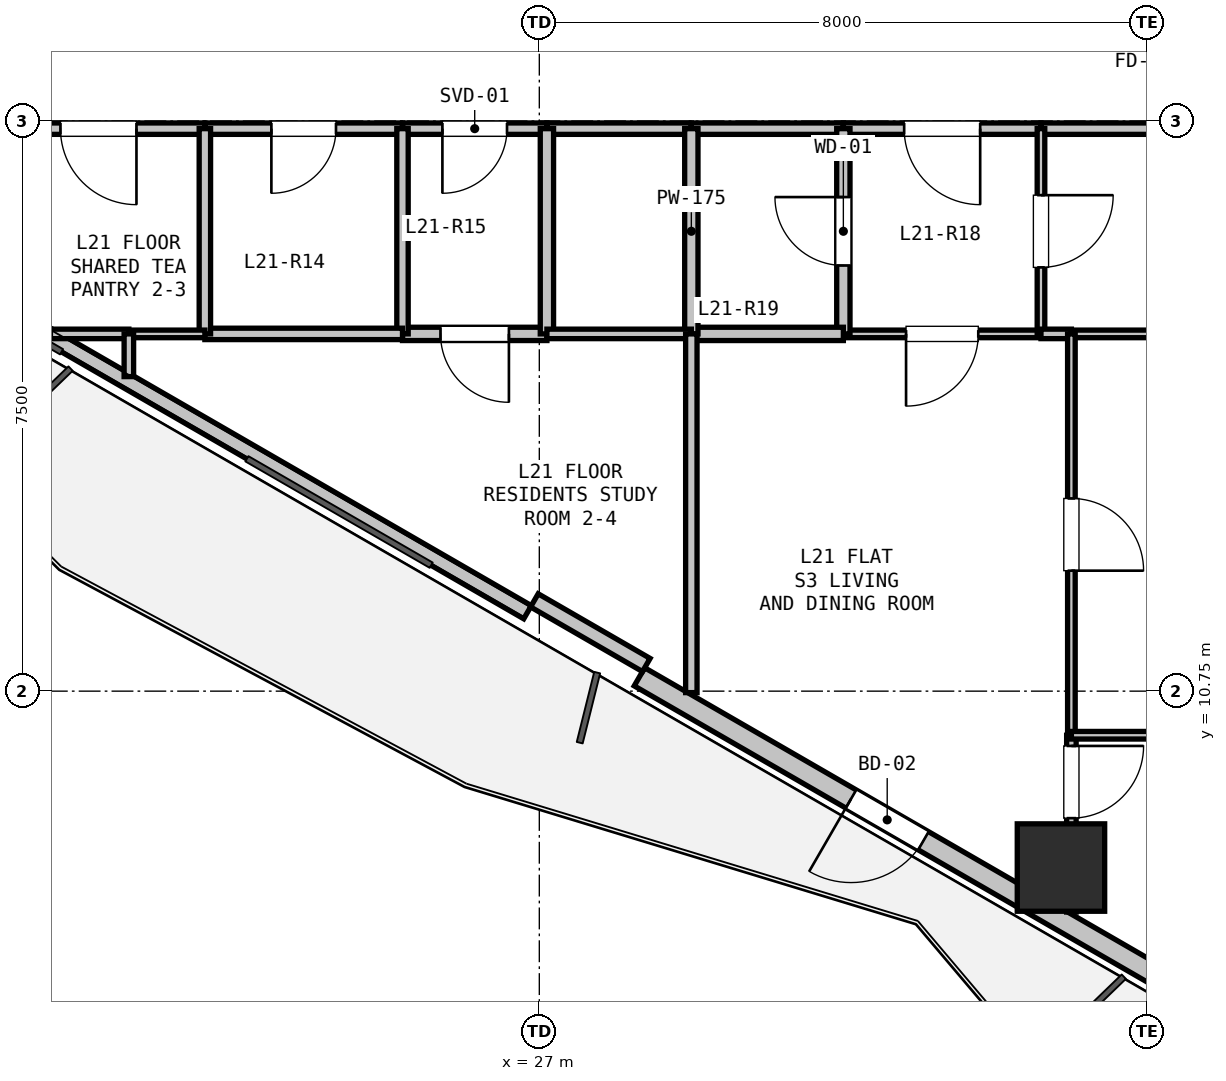
"""IFC4 building model, lengths in metres.
Left out: names, types, materials, properties, quantities, classifications, styles, units other than length and angle.
Written with IfcOpenShell. Run it as: python <this file> out.ifc"""

import sys

from ifc_helpers import new_model, si_unit, direction, frame, frame_2d, origin, origin_2d, place, context, subcontext, project, spatial, rectangle, hollow_rectangle, extrude, element, fill, save


model = new_model("IFC4")
c1 = context("Model", 3, precision=1e-05, world=origin(), true_north=direction((0.0, 1.0)))
c2 = subcontext(c1, "Body", "Model", "MODEL_VIEW")
j1 = project(units=[si_unit("LENGTHUNIT", "METRE"), si_unit("PLANEANGLEUNIT", "RADIAN")], contexts=[c1])
p1 = place(None, origin())
s1 = spatial("IfcSite", under=j1, at=p1, CompositionType="ELEMENT")
p2 = place(p1, origin())
s2 = spatial("IfcBuilding", under=s1, at=p2, CompositionType="ELEMENT")
p3 = place(p2, frame((0.0, 0.0, 80.1)))
s3 = spatial("IfcBuildingStorey", under=s2, at=p3, CompositionType="ELEMENT", Elevation=80.1)
p4 = place(p3, frame((33.863, 8.429, 0.0), z_axis=(0.0, 0.0, 1.0), x_axis=(1.0, 0.0, 0.0)))
e1 = element("IfcColumn", 1, at=p4, inside=s3, PredefinedType="COLUMN", context=c2, shape_type="SweptSolid", body=[
    extrude(hollow_rectangle(XDim=1.15, YDim=1.15, WallThickness=0.032, at=origin_2d()), origin(), (0.0, 0.0, 1.0), 3.3),
])
p5 = place(p3, frame((38.649, 4.973, 0.0), z_axis=(0.0, 0.0, 1.0), x_axis=(-0.866023023012, 0.500004123596, 0.0)))
e2 = element("IfcWall", 2, at=p5, inside=s3, PredefinedType="SOLIDWALL", context=c2, shape_type="SweptSolid", body=[
    extrude(rectangle(XDim=11.93, YDim=0.275, at=frame_2d((5.965, 0.0))), origin(), (0.0, 0.0, 1.0), 2.67),
])
p6 = place(p5, frame((7.616, 0.0, 0.0)))
e3 = element("IfcOpeningElement", 3, at=p6, cuts=e2, PredefinedType="OPENING", context=c2, shape_type="SweptSolid", body=[
    extrude(rectangle(XDim=1.1, YDim=2.1, at=frame_2d((0.55, 1.05))), frame((0.0, 0.147, 0.0), z_axis=(0.0, -1.0, 0.0), x_axis=(1.0, 0.0, 0.0)), (0.0, 0.0, 1.0), 0.295),
])
p7 = place(p5, frame((2.207, 0.0, 0.9)))
e4 = element("IfcOpeningElement", 4, at=p7, cuts=e2, PredefinedType="OPENING", context=c2, shape_type="SweptSolid", body=[
    extrude(rectangle(XDim=1.2, YDim=1.4, at=frame_2d((0.6, 0.7))), frame((0.0, 0.147, 0.0), z_axis=(0.0, -1.0, 0.0), x_axis=(1.0, 0.0, 0.0)), (0.0, 0.0, 1.0), 0.295),
])
p8 = place(p3, frame((26.845, 11.788, 0.0), z_axis=(0.0, 0.0, 1.0), x_axis=(-0.866027010039, 0.499997217876, 0.0)))
e5 = element("IfcWall", 5, at=p8, inside=s3, PredefinedType="PARAPET", context=c2, shape_type="SweptSolid", body=[
    extrude(rectangle(XDim=11.229, YDim=0.2, at=frame_2d((5.615, 0.0))), origin(), (0.0, 0.0, 1.0), 0.2),
])
p9 = place(p3, frame((28.407, 11.094, 0.0), z_axis=(0.0, 0.0, 1.0), x_axis=(-0.86605165483, 0.499954529098, 0.0)))
e6 = element("IfcWall", 6, at=p9, inside=s3, PredefinedType="PARAPET", context=c2, shape_type="SweptSolid", body=[
    extrude(rectangle(XDim=1.7, YDim=0.2, at=frame_2d((0.85, 0.0))), origin(), (0.0, 0.0, 1.0), 2.67),
])
p10 = place(p3, frame((35.8, 18.15, 0.0), z_axis=(0.0, 0.0, 1.0), x_axis=(-1.0, 0.0, 0.0)))
e7 = element("IfcWall", 7, at=p10, inside=s3, PredefinedType="PARTITIONING", context=c2, shape_type="SweptSolid", body=[
    extrude(rectangle(XDim=2.2, YDim=0.15, at=frame_2d((1.1, 0.0))), origin(), (0.0, 0.0, 1.0), 3.05),
])
p11 = place(p3, frame((33.6, 18.15, 0.0), z_axis=(0.0, 0.0, 1.0), x_axis=(-1.0, 0.0, 0.0)))
e8 = element("IfcWall", 8, at=p11, inside=s3, PredefinedType="PARTITIONING", context=c2, shape_type="SweptSolid", body=[
    extrude(rectangle(XDim=2.6, YDim=0.15, at=frame_2d((1.3, 0.0))), origin(), (0.0, 0.0, 1.0), 3.05),
])
p12 = place(p11, frame((0.8, 0.0, 0.0)))
e9 = element("IfcOpeningElement", 9, at=p12, cuts=e8, PredefinedType="OPENING", context=c2, shape_type="SweptSolid", body=[
    extrude(rectangle(XDim=1.0, YDim=2.15, at=frame_2d((0.5, 1.075))), frame((0.0, 0.085, 0.0), z_axis=(0.0, -1.0, 0.0), x_axis=(1.0, 0.0, 0.0)), (0.0, 0.0, 1.0), 0.17),
])
p13 = place(p3, frame((31.0, 18.15, 0.0), z_axis=(0.0, 0.0, 1.0), x_axis=(-1.0, 0.0, 0.0)))
e10 = element("IfcWall", 10, at=p13, inside=s3, PredefinedType="PARTITIONING", context=c2, shape_type="SweptSolid", body=[
    extrude(rectangle(XDim=2.0, YDim=0.15, at=frame_2d((1.0, 0.0))), origin(), (0.0, 0.0, 1.0), 3.05),
])
p14 = place(p3, frame((29.0, 18.15, 0.0), z_axis=(0.0, 0.0, 1.0), x_axis=(-1.0, 0.0, 0.0)))
e11 = element("IfcWall", 11, at=p14, inside=s3, PredefinedType="PARTITIONING", context=c2, shape_type="SweptSolid", body=[
    extrude(rectangle(XDim=1.9, YDim=0.15, at=frame_2d((0.95, 0.0))), origin(), (0.0, 0.0, 1.0), 3.05),
])
p15 = place(p3, frame((27.1, 18.15, 0.0), z_axis=(0.0, 0.0, 1.0), x_axis=(-1.0, 0.0, 0.0)))
e12 = element("IfcWall", 12, at=p15, inside=s3, PredefinedType="PARTITIONING", context=c2, shape_type="SweptSolid", body=[
    extrude(rectangle(XDim=1.9, YDim=0.15, at=frame_2d((0.95, 0.0))), origin(), (0.0, 0.0, 1.0), 3.05),
])
p16 = place(p15, frame((0.525, 0.0, 0.0)))
e13 = element("IfcOpeningElement", 13, at=p16, cuts=e12, PredefinedType="OPENING", context=c2, shape_type="SweptSolid", body=[
    extrude(rectangle(XDim=0.85, YDim=2.1, at=frame_2d((0.425, 1.05))), frame((0.0, 0.085, 0.0), z_axis=(0.0, -1.0, 0.0), x_axis=(1.0, 0.0, 0.0)), (0.0, 0.0, 1.0), 0.17),
])
p17 = place(p3, frame((25.2, 18.15, 0.0), z_axis=(0.0, 0.0, 1.0), x_axis=(-1.0, 0.0, 0.0)))
e14 = element("IfcWall", 14, at=p17, inside=s3, PredefinedType="PARTITIONING", context=c2, shape_type="SweptSolid", body=[
    extrude(rectangle(XDim=2.6, YDim=0.15, at=frame_2d((1.3, 0.0))), origin(), (0.0, 0.0, 1.0), 2.423),
])
p18 = place(p17, frame((0.875, 0.0, 0.0)))
e15 = element("IfcOpeningElement", 15, at=p18, cuts=e14, PredefinedType="OPENING", context=c2, shape_type="SweptSolid", body=[
    extrude(rectangle(XDim=0.85, YDim=2.1, at=frame_2d((0.425, 1.05))), frame((0.0, 0.085, 0.0), z_axis=(0.0, -1.0, 0.0), x_axis=(1.0, 0.0, 0.0)), (0.0, 0.0, 1.0), 0.17),
])
p19 = place(p3, frame((22.6, 18.15, 0.0), z_axis=(0.0, 0.0, 1.0), x_axis=(-1.0, 0.0, 0.0)))
e16 = element("IfcWall", 16, at=p19, inside=s3, PredefinedType="PARTITIONING", context=c2, shape_type="SweptSolid", body=[
    extrude(rectangle(XDim=2.8, YDim=0.15, at=frame_2d((1.4, 0.0))), origin(), (0.0, 0.0, 1.0), 3.05),
])
p20 = place(p19, frame((0.9, 0.0, 0.0)))
e17 = element("IfcOpeningElement", 17, at=p20, cuts=e16, PredefinedType="OPENING", context=c2, shape_type="SweptSolid", body=[
    extrude(rectangle(XDim=1.0, YDim=2.15, at=frame_2d((0.5, 1.075))), frame((0.0, 0.085, 0.0), z_axis=(0.0, -1.0, 0.0), x_axis=(1.0, 0.0, 0.0)), (0.0, 0.0, 1.0), 0.17),
])
p21 = place(p3, frame((33.6, 15.45, 0.0), z_axis=(0.0, 0.0, 1.0), x_axis=(-1.0, 0.0, 0.0)))
e18 = element("IfcWall", 18, at=p21, inside=s3, PredefinedType="PARTITIONING", context=c2, shape_type="SweptSolid", body=[
    extrude(rectangle(XDim=2.6, YDim=0.1, at=frame_2d((1.3, 0.0))), origin(), (0.0, 0.0, 1.0), 3.05),
])
p22 = place(p21, frame((0.825, 0.0, 0.0)))
e19 = element("IfcOpeningElement", 19, at=p22, cuts=e18, PredefinedType="OPENING", context=c2, shape_type="SweptSolid", body=[
    extrude(rectangle(XDim=0.95, YDim=2.1, at=frame_2d((0.475, 1.05))), frame((0.0, 0.06, 0.0), z_axis=(0.0, -1.0, 0.0), x_axis=(1.0, 0.0, 0.0)), (0.0, 0.0, 1.0), 0.12),
])
p23 = place(p3, frame((31.0, 15.45, 0.0), z_axis=(0.0, 0.0, 1.0), x_axis=(0.0, 1.0, 0.0)))
e20 = element("IfcWall", 20, at=p23, inside=s3, PredefinedType="PLUMBINGWALL", context=c2, shape_type="SweptSolid", body=[
    extrude(rectangle(XDim=2.7, YDim=0.175, at=frame_2d((1.35, 0.0))), origin(), (0.0, 0.0, 1.0), 3.05),
])
p24 = place(p23, frame((0.9, 0.0, 0.0)))
e21 = element("IfcOpeningElement", 21, at=p24, cuts=e20, PredefinedType="OPENING", context=c2, shape_type="SweptSolid", body=[
    extrude(rectangle(XDim=0.9, YDim=2.1, at=frame_2d((0.45, 1.05))), frame((0.0, 0.097, 0.0), z_axis=(0.0, -1.0, 0.0), x_axis=(1.0, 0.0, 0.0)), (0.0, 0.0, 1.0), 0.195),
])
p25 = place(p3, frame((33.6, 18.15, 0.0), z_axis=(0.0, 0.0, 1.0), x_axis=(0.0, -1.0, 0.0)))
e22 = element("IfcWall", 22, at=p25, inside=s3, PredefinedType="PARTITIONING", context=c2, shape_type="SweptSolid", body=[
    extrude(rectangle(XDim=2.7, YDim=0.1, at=frame_2d((1.35, 0.0))), origin(), (0.0, 0.0, 1.0), 3.05),
])
p26 = place(p25, frame((0.875, 0.0, 0.0)))
e23 = element("IfcOpeningElement", 23, at=p26, cuts=e22, PredefinedType="OPENING", context=c2, shape_type="SweptSolid", body=[
    extrude(rectangle(XDim=0.95, YDim=2.1, at=frame_2d((0.475, 1.05))), frame((0.0, 0.06, 0.0), z_axis=(0.0, -1.0, 0.0), x_axis=(1.0, 0.0, 0.0)), (0.0, 0.0, 1.0), 0.12),
])
p27 = place(p3, frame((27.1, 15.45, 0.0), z_axis=(0.0, 0.0, 1.0), x_axis=(-1.0, 0.0, 0.0)))
e24 = element("IfcWall", 24, at=p27, inside=s3, PredefinedType="PLUMBINGWALL", context=c2, shape_type="SweptSolid", body=[
    extrude(rectangle(XDim=1.9, YDim=0.175, at=frame_2d((0.95, 0.0))), origin(), (0.0, 0.0, 1.0), 2.423),
])
p28 = place(p27, frame((0.5, 0.0, 0.0)))
e25 = element("IfcOpeningElement", 25, at=p28, cuts=e24, PredefinedType="OPENING", context=c2, shape_type="SweptSolid", body=[
    extrude(rectangle(XDim=0.9, YDim=2.1, at=frame_2d((0.45, 1.05))), frame((0.0, 0.097, 0.0), z_axis=(0.0, -1.0, 0.0), x_axis=(1.0, 0.0, 0.0)), (0.0, 0.0, 1.0), 0.195),
])
p29 = place(p3, frame((25.2, 15.45, 0.0), z_axis=(0.0, 0.0, 1.0), x_axis=(0.0, 1.0, 0.0)))
e26 = element("IfcWall", 26, at=p29, inside=s3, PredefinedType="PARTITIONING", context=c2, shape_type="SweptSolid", body=[
    extrude(rectangle(XDim=2.7, YDim=0.15, at=frame_2d((1.35, 0.0))), origin(), (0.0, 0.0, 1.0), 2.423),
])
p30 = place(p3, frame((27.1, 18.15, 0.0), z_axis=(0.0, 0.0, 1.0), x_axis=(0.0, -1.0, 0.0)))
e27 = element("IfcWall", 27, at=p30, inside=s3, PredefinedType="PLUMBINGWALL", context=c2, shape_type="SweptSolid", body=[
    extrude(rectangle(XDim=2.7, YDim=0.175, at=frame_2d((1.35, 0.0))), origin(), (0.0, 0.0, 1.0), 3.05),
])
p31 = place(p3, frame((31.0, 15.45, 0.0), z_axis=(0.0, 0.0, 1.0), x_axis=(-1.0, 0.0, 0.0)))
e28 = element("IfcWall", 28, at=p31, inside=s3, PredefinedType="PLUMBINGWALL", context=c2, shape_type="SweptSolid", body=[
    extrude(rectangle(XDim=2.0, YDim=0.175, at=frame_2d((1.0, 0.0))), origin(), (0.0, 0.0, 1.0), 3.05),
])
p32 = place(p3, frame((29.0, 15.45, 0.0), z_axis=(0.0, 0.0, 1.0), x_axis=(0.0, 1.0, 0.0)))
e29 = element("IfcWall", 29, at=p32, inside=s3, PredefinedType="PLUMBINGWALL", context=c2, shape_type="SweptSolid", body=[
    extrude(rectangle(XDim=2.7, YDim=0.175, at=frame_2d((1.35, 0.0))), origin(), (0.0, 0.0, 1.0), 3.05),
])
p33 = place(p3, frame((42.873, 15.45, 0.0), z_axis=(0.0, 0.0, 1.0), x_axis=(-1.0, 0.0, 0.0)))
e30 = element("IfcWall", 30, at=p33, inside=s3, PredefinedType="PARTITIONING", context=c2, shape_type="SweptSolid", body=[
    extrude(rectangle(XDim=8.873, YDim=0.1, at=frame_2d((4.437, 0.0))), origin(), (0.0, 0.0, 1.0), 2.365),
])
p34 = place(p33, frame((3.962, 0.0, 0.0)))
e31 = element("IfcOpeningElement", 31, at=p34, cuts=e30, PredefinedType="OPENING", context=c2, shape_type="SweptSolid", body=[
    extrude(rectangle(XDim=0.95, YDim=2.1, at=frame_2d((0.475, 1.05))), frame((0.0, 0.06, 0.0), z_axis=(0.0, -1.0, 0.0), x_axis=(1.0, 0.0, 0.0)), (0.0, 0.0, 1.0), 0.12),
])
p35 = place(p3, frame((34.0, 15.45, 0.0), z_axis=(0.0, 0.0, 1.0), x_axis=(-1.0, 0.0, 0.0)))
e32 = element("IfcWall", 32, at=p35, inside=s3, PredefinedType="PARTITIONING", context=c2, shape_type="SweptSolid", body=[
    extrude(rectangle(XDim=0.4, YDim=0.125, at=frame_2d((0.2, 0.0))), origin(), (0.0, 0.0, 1.0), 3.05),
])
p36 = place(p3, frame((25.2, 15.45, 0.0), z_axis=(0.0, 0.0, 1.0), x_axis=(-1.0, 0.0, 0.0)))
e33 = element("IfcWall", 33, at=p36, inside=s3, PredefinedType="PARTITIONING", context=c2, shape_type="SweptSolid", body=[
    extrude(rectangle(XDim=2.6, YDim=0.15, at=frame_2d((1.3, 0.0))), origin(), (0.0, 0.0, 1.0), 3.05),
])
p37 = place(p3, frame((22.6, 15.45, 0.0), z_axis=(0.0, 0.0, 1.0), x_axis=(0.0, 1.0, 0.0)))
e34 = element("IfcWall", 34, at=p37, inside=s3, PredefinedType="PARTITIONING", context=c2, shape_type="SweptSolid", body=[
    extrude(rectangle(XDim=2.7, YDim=0.15, at=frame_2d((1.35, 0.0))), origin(), (0.0, 0.0, 1.0), 3.05),
])
p38 = place(p3, frame((22.6, 15.45, 0.0), z_axis=(0.0, 0.0, 1.0), x_axis=(-1.0, 0.0, 0.0)))
e35 = element("IfcWall", 35, at=p38, inside=s3, PredefinedType="PARTITIONING", context=c2, shape_type="SweptSolid", body=[
    extrude(rectangle(XDim=1.0, YDim=0.1, at=frame_2d((0.5, 0.0))), origin(), (0.0, 0.0, 1.0), 2.365),
])
p39 = place(p3, frame((21.6, 15.45, 0.0), z_axis=(0.0, 0.0, 1.0), x_axis=(-1.0, 0.0, 0.0)))
e36 = element("IfcWall", 36, at=p39, inside=s3, PredefinedType="PARTITIONING", context=c2, shape_type="SweptSolid", body=[
    extrude(rectangle(XDim=1.032, YDim=0.125, at=frame_2d((0.516, 0.0))), origin(), (0.0, 0.0, 1.0), 2.365),
])
p40 = place(p3, frame((27.1, 15.45, 0.0), z_axis=(0.0, 0.0, 1.0), x_axis=(1.0, 0.0, 0.0)))
e37 = element("IfcWall", 37, at=p40, inside=s3, PredefinedType="PARTITIONING", context=c2, shape_type="SweptSolid", body=[
    extrude(rectangle(XDim=1.9, YDim=0.125, at=frame_2d((0.95, 0.0))), origin(), (0.0, 0.0, 1.0), 3.05),
])
p41 = place(p3, frame((29.0, 15.45, 0.0), z_axis=(0.0, 0.0, 1.0), x_axis=(0.0, -1.0, 0.0)))
e38 = element("IfcWall", 38, at=p41, inside=s3, PredefinedType="PARTITIONING", context=c2, shape_type="SweptSolid", body=[
    extrude(rectangle(XDim=4.719, YDim=0.15, at=frame_2d((2.36, 0.0))), origin(), (0.0, 0.0, 1.0), 2.365),
])
p42 = place(p3, frame((21.6, 14.888, 0.0), z_axis=(0.0, 0.0, 1.0), x_axis=(0.0, 1.0, 0.0)))
e39 = element("IfcWall", 39, at=p42, inside=s3, PredefinedType="PARTITIONING", context=c2, shape_type="SweptSolid", body=[
    extrude(rectangle(XDim=0.562, YDim=0.125, at=frame_2d((0.281, 0.0))), origin(), (0.0, 0.0, 1.0), 2.365),
])
p43 = place(p3, frame((34.0, 15.45, 0.0), z_axis=(0.0, 0.0, 1.0), x_axis=(0.0, -1.0, 0.0)))
e40 = element("IfcWall", 40, at=p43, inside=s3, PredefinedType="PARTITIONING", context=c2, shape_type="SweptSolid", body=[
    extrude(rectangle(XDim=5.28, YDim=0.1, at=frame_2d((2.64, 0.0))), origin(), (0.0, 0.0, 1.0), 3.05),
])
p44 = place(p43, frame((2.165, 0.0, 0.0)))
e41 = element("IfcOpeningElement", 41, at=p44, cuts=e40, PredefinedType="OPENING", context=c2, shape_type="SweptSolid", body=[
    extrude(rectangle(XDim=0.95, YDim=2.1, at=frame_2d((0.475, 1.05))), frame((0.0, 0.06, 0.0), z_axis=(0.0, -1.0, 0.0), x_axis=(1.0, 0.0, 0.0)), (0.0, 0.0, 1.0), 0.12),
])
p45 = place(p3, frame((34.0, 10.17, 0.0), z_axis=(0.0, 0.0, 1.0), x_axis=(0.0, -1.0, 0.0)))
e42 = element("IfcWall", 42, at=p45, inside=s3, PredefinedType="PARTITIONING", context=c2, shape_type="SweptSolid", body=[
    extrude(rectangle(XDim=2.326, YDim=0.125, at=frame_2d((1.163, 0.0))), origin(), (0.0, 0.0, 1.0), 3.05),
])
p46 = place(p45, frame((0.141, 0.0, 0.0)))
e43 = element("IfcOpeningElement", 43, at=p46, cuts=e42, PredefinedType="OPENING", context=c2, shape_type="SweptSolid", body=[
    extrude(rectangle(XDim=0.95, YDim=2.1, at=frame_2d((0.475, 1.05))), frame((0.0, 0.073, 0.0), z_axis=(0.0, -1.0, 0.0), x_axis=(1.0, 0.0, 0.0)), (0.0, 0.0, 1.0), 0.145),
])
p47 = place(p3, frame((34.0, 10.17, 0.0), z_axis=(0.0, 0.0, 1.0), x_axis=(1.0, 0.0, 0.0)))
e44 = element("IfcWall", 44, at=p47, inside=s3, PredefinedType="PARTITIONING", context=c2, shape_type="SweptSolid", body=[
    extrude(rectangle(XDim=8.873, YDim=0.1, at=frame_2d((4.437, 0.0))), origin(), (0.0, 0.0, 1.0), 2.423),
])
p48 = place(p47, frame((3.962, 0.0, 0.0)))
e45 = element("IfcOpeningElement", 45, at=p48, cuts=e44, PredefinedType="OPENING", context=c2, shape_type="SweptSolid", body=[
    extrude(rectangle(XDim=0.95, YDim=2.1, at=frame_2d((0.475, 1.05))), frame((0.0, 0.06, 0.0), z_axis=(0.0, -1.0, 0.0), x_axis=(1.0, 0.0, 0.0)), (0.0, 0.0, 1.0), 0.12),
])
p49 = place(p6, origin())
e46 = element("IfcDoor", 46, at=p49, inside=s3, OperationType="SINGLE_SWING_RIGHT", PredefinedType="DOOR", context=c2, shape_type="SweptSolid", body=[
    extrude(rectangle(XDim=1.1, YDim=2.1, at=frame_2d((0.55, 1.05))), frame((0.0, 0.025, 0.0), z_axis=(0.0, -1.0, 0.0), x_axis=(1.0, 0.0, 0.0)), (0.0, 0.0, 1.0), 0.05),
])
fill(e3, e46)
p50 = place(p12, origin())
e47 = element("IfcDoor", 47, at=p50, inside=s3, OperationType="SINGLE_SWING_LEFT", PredefinedType="DOOR", context=c2, shape_type="SweptSolid", body=[
    extrude(rectangle(XDim=1.0, YDim=2.15, at=frame_2d((0.5, 1.075))), frame((0.0, 0.025, 0.0), z_axis=(0.0, -1.0, 0.0), x_axis=(1.0, 0.0, 0.0)), (0.0, 0.0, 1.0), 0.05),
])
fill(e9, e47)
p51 = place(p16, origin())
e48 = element("IfcDoor", 48, at=p51, inside=s3, OperationType="SINGLE_SWING_RIGHT", PredefinedType="DOOR", context=c2, shape_type="SweptSolid", body=[
    extrude(rectangle(XDim=0.85, YDim=2.1, at=frame_2d((0.425, 1.05))), frame((0.0, 0.025, 0.0), z_axis=(0.0, -1.0, 0.0), x_axis=(1.0, 0.0, 0.0)), (0.0, 0.0, 1.0), 0.05),
])
fill(e13, e48)
p52 = place(p18, origin())
e49 = element("IfcDoor", 49, at=p52, inside=s3, OperationType="SINGLE_SWING_RIGHT", PredefinedType="DOOR", context=c2, shape_type="SweptSolid", body=[
    extrude(rectangle(XDim=0.85, YDim=2.1, at=frame_2d((0.425, 1.05))), frame((0.0, 0.025, 0.0), z_axis=(0.0, -1.0, 0.0), x_axis=(1.0, 0.0, 0.0)), (0.0, 0.0, 1.0), 0.05),
])
fill(e15, e49)
p53 = place(p20, origin())
e50 = element("IfcDoor", 50, at=p53, inside=s3, OperationType="SINGLE_SWING_LEFT", PredefinedType="DOOR", context=c2, shape_type="SweptSolid", body=[
    extrude(rectangle(XDim=1.0, YDim=2.15, at=frame_2d((0.5, 1.075))), frame((0.0, 0.025, 0.0), z_axis=(0.0, -1.0, 0.0), x_axis=(1.0, 0.0, 0.0)), (0.0, 0.0, 1.0), 0.05),
])
fill(e17, e50)
p54 = place(p24, origin())
e51 = element("IfcDoor", 51, at=p54, inside=s3, OperationType="SINGLE_SWING_RIGHT", PredefinedType="DOOR", context=c2, shape_type="SweptSolid", body=[
    extrude(rectangle(XDim=0.9, YDim=2.1, at=frame_2d((0.45, 1.05))), frame((0.0, 0.025, 0.0), z_axis=(0.0, -1.0, 0.0), x_axis=(1.0, 0.0, 0.0)), (0.0, 0.0, 1.0), 0.05),
])
fill(e21, e51)
p55 = place(p26, origin())
e52 = element("IfcDoor", 52, at=p55, inside=s3, OperationType="SINGLE_SWING_LEFT", PredefinedType="DOOR", context=c2, shape_type="SweptSolid", body=[
    extrude(rectangle(XDim=0.95, YDim=2.1, at=frame_2d((0.475, 1.05))), frame((0.0, 0.025, 0.0), z_axis=(0.0, -1.0, 0.0), x_axis=(1.0, 0.0, 0.0)), (0.0, 0.0, 1.0), 0.05),
])
fill(e23, e52)
p56 = place(p22, origin())
e53 = element("IfcDoor", 53, at=p56, inside=s3, OperationType="SINGLE_SWING_RIGHT", PredefinedType="DOOR", context=c2, shape_type="SweptSolid", body=[
    extrude(rectangle(XDim=0.95, YDim=2.1, at=frame_2d((0.475, 1.05))), frame((0.0, 0.025, 0.0), z_axis=(0.0, -1.0, 0.0), x_axis=(1.0, 0.0, 0.0)), (0.0, 0.0, 1.0), 0.05),
])
fill(e19, e53)
p57 = place(p46, origin())
e54 = element("IfcDoor", 54, at=p57, inside=s3, OperationType="SINGLE_SWING_LEFT", PredefinedType="DOOR", context=c2, shape_type="SweptSolid", body=[
    extrude(rectangle(XDim=0.95, YDim=2.1, at=frame_2d((0.475, 1.05))), frame((0.0, 0.025, 0.0), z_axis=(0.0, -1.0, 0.0), x_axis=(1.0, 0.0, 0.0)), (0.0, 0.0, 1.0), 0.05),
])
fill(e43, e54)
p58 = place(p44, origin())
e55 = element("IfcDoor", 55, at=p58, inside=s3, OperationType="SINGLE_SWING_RIGHT", PredefinedType="DOOR", context=c2, shape_type="SweptSolid", body=[
    extrude(rectangle(XDim=0.95, YDim=2.1, at=frame_2d((0.475, 1.05))), frame((0.0, 0.025, 0.0), z_axis=(0.0, -1.0, 0.0), x_axis=(1.0, 0.0, 0.0)), (0.0, 0.0, 1.0), 0.05),
])
fill(e41, e55)
p59 = place(p28, origin())
e56 = element("IfcDoor", 56, at=p59, inside=s3, OperationType="SINGLE_SWING_LEFT", PredefinedType="DOOR", context=c2, shape_type="SweptSolid", body=[
    extrude(rectangle(XDim=0.9, YDim=2.1, at=frame_2d((0.45, 1.05))), frame((0.0, 0.025, 0.0), z_axis=(0.0, -1.0, 0.0), x_axis=(1.0, 0.0, 0.0)), (0.0, 0.0, 1.0), 0.05),
])
fill(e25, e56)
save(model, sys.argv[1])
